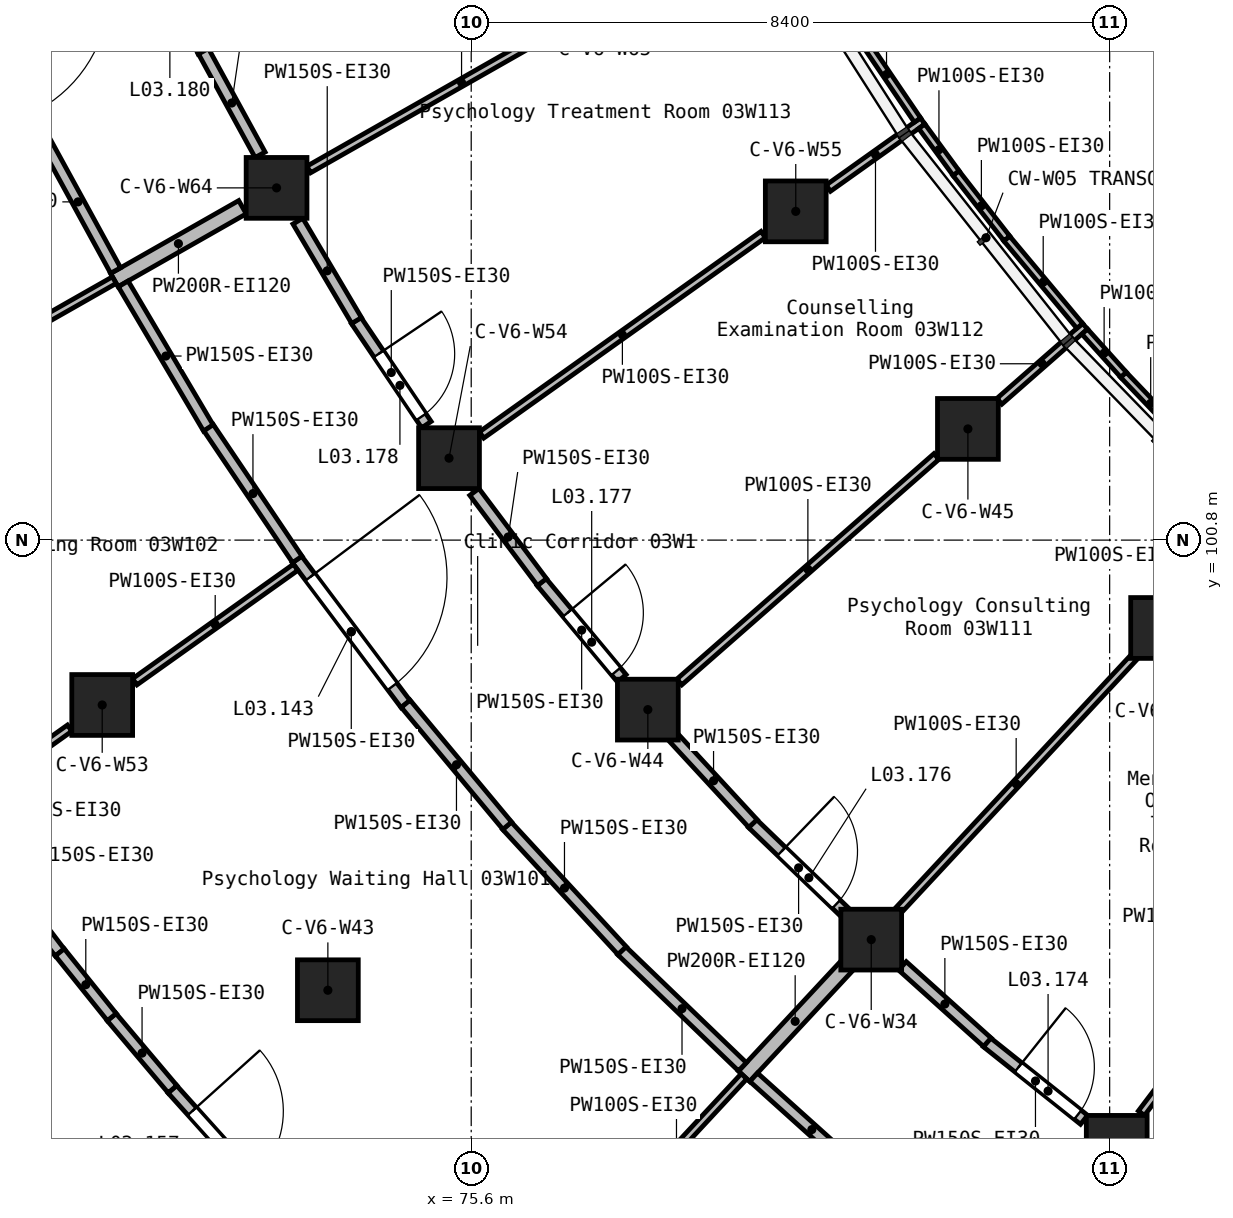
"""IFC4 building model, lengths in metres.
Left out: names, types, materials, properties, quantities, classifications, styles, units other than length and angle.
Written with IfcOpenShell. Run it as: python <this file> out.ifc"""

import sys

from ifc_helpers import new_model, si_unit, direction, frame, frame_2d, origin, origin_2d, place, context, subcontext, project, spatial, rectangle, extrude, element, fill, save


model = new_model("IFC4")
c1 = context("Model", 3, precision=1e-05, world=origin(), true_north=direction((0.0, 1.0)))
c2 = subcontext(c1, "Body", "Model", "MODEL_VIEW")
j1 = project(units=[si_unit("LENGTHUNIT", "METRE"), si_unit("PLANEANGLEUNIT", "RADIAN")], contexts=[c1])
p1 = place(None, origin())
s1 = spatial("IfcSite", under=j1, at=p1, CompositionType="ELEMENT")
p2 = place(p1, origin())
s2 = spatial("IfcBuilding", under=s1, at=p2, CompositionType="ELEMENT")
p3 = place(p2, frame((0.0, 0.0, 16.8)))
s3 = spatial("IfcBuildingStorey", under=s2, at=p3, CompositionType="ELEMENT", Elevation=16.8)
for number, where, z_axis, x_axis in (
    (1, (70.745, 98.631, 0.0), (0.0, 0.0, 1.0), (1.0, 0.0, 0.0)),
    (2, (73.039, 105.434, 0.0), (0.0, 0.0, 1.0), (1.0, 0.0, 0.0)),
    (3, (73.714, 94.878, 0.0), (0.0, 0.0, 1.0), (1.0, 0.0, 0.0)),
    (4, (75.308, 101.878, 0.0), (0.0, 0.0, 1.0), (1.0, 0.0, 0.0)),
    (5, (77.924, 98.57, 0.0), (0.0, 0.0, 1.0), (1.0, 0.0, 0.0)),
    (6, (79.87, 105.125, 0.0), (0.0, 0.0, 1.0), (1.0, 0.0, 0.0)),
    (7, (80.863, 95.544, 0.0), (0.0, 0.0, 1.0), (1.0, 0.0, 0.0)),
    (8, (82.135, 102.263, 0.0), (0.0, 0.0, 1.0), (1.0, 0.0, 0.0)),
    (9, (84.093, 92.831, 0.0), (0.0, 0.0, 1.0), (1.0, 0.0, 0.0)),
    (10, (84.677, 99.644, 0.0), (0.0, 0.0, 1.0), (1.0, 0.0, 0.0)),
):
    element("IfcColumn", number, at=place(p3, frame(where, z_axis=z_axis, x_axis=x_axis)), inside=s3, PredefinedType="COLUMN", context=c2, shape_type="SweptSolid", body=[
        extrude(rectangle(XDim=0.8, YDim=0.8, at=origin_2d()), origin(), (0.0, 0.0, 1.0), 4.2),
    ])
p4 = place(p3, frame((70.905, 104.221, 0.0), z_axis=(0.0, 0.0, 1.0), x_axis=(0.869256176146, 0.494361912198, 0.0)))
e11 = element("IfcWall", 11, at=p4, inside=s3, PredefinedType="SOLIDWALL", context=c2, shape_type="SweptSolid", body=[
    extrude(rectangle(XDim=1.939, YDim=0.2, at=frame_2d((0.97, 0.0))), origin(), (0.0, 0.0, 1.0), 3.9),
])
p5 = place(p3, frame((79.19, 93.746, 0.0), z_axis=(0.0, 0.0, 1.0), x_axis=(0.681171780306, 0.732123627344, 0.0)))
e12 = element("IfcWall", 12, at=p5, inside=s3, PredefinedType="SOLIDWALL", context=c2, shape_type="SweptSolid", body=[
    extrude(rectangle(XDim=1.974, YDim=0.2, at=frame_2d((0.987, 0.0))), origin(), (0.0, 0.0, 1.0), 3.9),
])
p6 = place(p3, frame((73.307, 100.547, 0.0), z_axis=(0.0, 0.0, 1.0), x_axis=(0.600377090661, -0.799717043091, 0.0)))
e13 = element("IfcWall", 13, at=p6, inside=s3, PredefinedType="PARTITIONING", context=c2, shape_type="SweptSolid", body=[
    extrude(rectangle(XDim=2.382, YDim=0.15, at=frame_2d((1.191, 0.0))), origin(), (0.0, 0.0, 1.0), 3.9),
])
p7 = place(p6, frame((0.291, 0.0, 0.0)))
e14 = element("IfcOpeningElement", 14, at=p7, cuts=e13, PredefinedType="OPENING", context=c2, shape_type="SweptSolid", body=[
    extrude(rectangle(XDim=1.8, YDim=2.1, at=frame_2d((0.9, 1.05))), frame((0.0, 0.085, 0.0), z_axis=(0.0, -1.0, 0.0), x_axis=(1.0, 0.0, 0.0)), (0.0, 0.0, 1.0), 0.17),
])
p8 = place(p3, frame((77.579, 95.4, 0.0), z_axis=(0.0, 0.0, 1.0), x_axis=(0.720594722174, -0.693356507415, 0.0)))
e15 = element("IfcWall", 15, at=p8, inside=s3, PredefinedType="PARTITIONING", context=c2, shape_type="SweptSolid", body=[
    extrude(rectangle(XDim=2.205, YDim=0.15, at=frame_2d((1.103, 0.0))), origin(), (0.0, 0.0, 1.0), 3.9),
])
p9 = place(p3, frame((76.069, 97.043, 0.0), z_axis=(0.0, 0.0, 1.0), x_axis=(0.678030610295, -0.735033666918, 0.0)))
e16 = element("IfcWall", 16, at=p9, inside=s3, PredefinedType="PARTITIONING", context=c2, shape_type="SweptSolid", body=[
    extrude(rectangle(XDim=2.236, YDim=0.15, at=frame_2d((1.118, 0.0))), origin(), (0.0, 0.0, 1.0), 3.9),
])
p10 = place(p3, frame((71.021, 104.171, 0.0), z_axis=(0.0, 0.0, 1.0), x_axis=(0.50873677225, -0.860922119916, 0.0)))
e17 = element("IfcWall", 17, at=p10, inside=s3, PredefinedType="PARTITIONING", context=c2, shape_type="SweptSolid", body=[
    extrude(rectangle(XDim=2.205, YDim=0.15, at=frame_2d((1.103, 0.0))), origin(), (0.0, 0.0, 1.0), 3.9),
])
p11 = place(p3, frame((79.316, 93.733, 0.0), z_axis=(0.0, 0.0, 1.0), x_axis=(0.74346507851, -0.668774758073, 0.0)))
e18 = element("IfcWall", 18, at=p11, inside=s3, PredefinedType="PARTITIONING", context=c2, shape_type="SweptSolid", body=[
    extrude(rectangle(XDim=2.059, YDim=0.15, at=frame_2d((1.03, 0.0))), origin(), (0.0, 0.0, 1.0), 3.9),
])
p12 = place(p3, frame((72.145, 102.278, 0.0), z_axis=(0.0, 0.0, 1.0), x_axis=(0.558900636953, -0.829234633873, 0.0)))
e19 = element("IfcWall", 19, at=p12, inside=s3, PredefinedType="PARTITIONING", context=c2, shape_type="SweptSolid", body=[
    extrude(rectangle(XDim=2.089, YDim=0.15, at=frame_2d((1.044, 0.0))), origin(), (0.0, 0.0, 1.0), 3.9),
])
p13 = place(p3, frame((74.738, 98.647, 0.0), z_axis=(0.0, 0.0, 1.0), x_axis=(0.640000381719, -0.768374590548, 0.0)))
e20 = element("IfcWall", 20, at=p13, inside=s3, PredefinedType="PARTITIONING", context=c2, shape_type="SweptSolid", body=[
    extrude(rectangle(XDim=2.088, YDim=0.15, at=frame_2d((1.044, 0.0))), origin(), (0.0, 0.0, 1.0), 3.9),
])
p14 = place(p3, frame((69.933, 106.153, 0.0), z_axis=(0.0, 0.0, 1.0), x_axis=(0.479964929401, -0.877287676047, 0.0)))
e21 = element("IfcWall", 21, at=p14, inside=s3, PredefinedType="PARTITIONING", context=c2, shape_type="SweptSolid", body=[
    extrude(rectangle(XDim=2.059, YDim=0.15, at=frame_2d((1.03, 0.0))), origin(), (0.0, 0.0, 1.0), 3.9),
])
p15 = place(p3, frame((74.086, 103.69, 0.0), z_axis=(0.0, 0.0, 1.0), x_axis=(0.558985889655, -0.829177167538, 0.0)))
e22 = element("IfcWall", 22, at=p15, inside=s3, PredefinedType="PARTITIONING", context=c2, shape_type="SweptSolid", body=[
    extrude(rectangle(XDim=1.654, YDim=0.15, at=frame_2d((0.827, 0.0))), origin(), (0.0, 0.0, 1.0), 3.9),
])
p16 = place(p15, frame((0.53, 0.0, 0.0)))
e23 = element("IfcOpeningElement", 23, at=p16, cuts=e22, PredefinedType="OPENING", context=c2, shape_type="SweptSolid", body=[
    extrude(rectangle(XDim=1.0, YDim=2.1, at=frame_2d((0.5, 1.05))), frame((0.0, 0.085, 0.0), z_axis=(0.0, -1.0, 0.0), x_axis=(1.0, 0.0, 0.0)), (0.0, 0.0, 1.0), 0.17),
])
p17 = place(p3, frame((82.385, 94.194, 0.0), z_axis=(0.0, 0.0, 1.0), x_axis=(0.781756052881, -0.623584375833, 0.0)))
e24 = element("IfcWall", 24, at=p17, inside=s3, PredefinedType="PARTITIONING", context=c2, shape_type="SweptSolid", body=[
    extrude(rectangle(XDim=1.636, YDim=0.15, at=frame_2d((0.818, 0.0))), origin(), (0.0, 0.0, 1.0), 3.9),
])
p18 = place(p17, frame((0.53, 0.0, 0.0)))
e25 = element("IfcOpeningElement", 25, at=p18, cuts=e24, PredefinedType="OPENING", context=c2, shape_type="SweptSolid", body=[
    extrude(rectangle(XDim=1.0, YDim=2.1, at=frame_2d((0.5, 1.05))), frame((0.0, 0.085, 0.0), z_axis=(0.0, -1.0, 0.0), x_axis=(1.0, 0.0, 0.0)), (0.0, 0.0, 1.0), 0.17),
])
p19 = place(p3, frame((71.346, 108.771, 0.0), z_axis=(0.0, 0.0, 1.0), x_axis=(0.42702903496, -0.904237912997, 0.0)))
e26 = element("IfcWall", 26, at=p19, inside=s3, PredefinedType="PARTITIONING", context=c2, shape_type="SweptSolid", body=[
    extrude(rectangle(XDim=1.708, YDim=0.15, at=frame_2d((0.854, 0.0))), origin(), (0.0, 0.0, 1.0), 3.9),
])
p20 = place(p19, frame((0.178, 0.0, 0.0)))
e27 = element("IfcOpeningElement", 27, at=p20, cuts=e26, PredefinedType="OPENING", context=c2, shape_type="SweptSolid", body=[
    extrude(rectangle(XDim=1.0, YDim=2.1, at=frame_2d((0.5, 1.05))), frame((0.0, 0.085, 0.0), z_axis=(0.0, -1.0, 0.0), x_axis=(1.0, 0.0, 0.0)), (0.0, 0.0, 1.0), 0.17),
])
p21 = place(p3, frame((79.301, 97.072, 0.0), z_axis=(0.0, 0.0, 1.0), x_axis=(0.720465115712, -0.69349118022, 0.0)))
e28 = element("IfcWall", 28, at=p21, inside=s3, PredefinedType="PARTITIONING", context=c2, shape_type="SweptSolid", body=[
    extrude(rectangle(XDim=1.684, YDim=0.15, at=frame_2d((0.842, 0.0))), origin(), (0.0, 0.0, 1.0), 3.9),
])
p22 = place(p21, frame((0.53, 0.0, 0.0)))
e29 = element("IfcOpeningElement", 29, at=p22, cuts=e28, PredefinedType="OPENING", context=c2, shape_type="SweptSolid", body=[
    extrude(rectangle(XDim=1.0, YDim=2.1, at=frame_2d((0.5, 1.05))), frame((0.0, 0.085, 0.0), z_axis=(0.0, -1.0, 0.0), x_axis=(1.0, 0.0, 0.0)), (0.0, 0.0, 1.0), 0.17),
])
p23 = place(p3, frame((78.27, 98.195, 0.0), z_axis=(0.0, 0.0, 1.0), x_axis=(0.678273469528, -0.73480956753, 0.0)))
e30 = element("IfcWall", 30, at=p23, inside=s3, PredefinedType="PARTITIONING", context=c2, shape_type="SweptSolid", body=[
    extrude(rectangle(XDim=1.529, YDim=0.15, at=frame_2d((0.764, 0.0))), origin(), (0.0, 0.0, 1.0), 3.9),
])
p24 = place(p3, frame((76.526, 100.249, 0.0), z_axis=(0.0, 0.0, 1.0), x_axis=(0.640038659854, -0.768342706019, 0.0)))
e31 = element("IfcWall", 31, at=p24, inside=s3, PredefinedType="PARTITIONING", context=c2, shape_type="SweptSolid", body=[
    extrude(rectangle(XDim=1.648, YDim=0.15, at=frame_2d((0.824, 0.0))), origin(), (0.0, 0.0, 1.0), 3.9),
])
p25 = place(p24, frame((0.53, 0.0, 0.0)))
e32 = element("IfcOpeningElement", 32, at=p25, cuts=e31, PredefinedType="OPENING", context=c2, shape_type="SweptSolid", body=[
    extrude(rectangle(XDim=1.0, YDim=2.1, at=frame_2d((0.5, 1.05))), frame((0.0, 0.085, 0.0), z_axis=(0.0, -1.0, 0.0), x_axis=(1.0, 0.0, 0.0)), (0.0, 0.0, 1.0), 0.17),
])
p26 = place(p3, frame((73.319, 104.997, 0.0), z_axis=(0.0, 0.0, 1.0), x_axis=(0.508740142918, -0.86092012811, 0.0)))
e33 = element("IfcWall", 33, at=p26, inside=s3, PredefinedType="PARTITIONING", context=c2, shape_type="SweptSolid", body=[
    extrude(rectangle(XDim=1.519, YDim=0.15, at=frame_2d((0.759, 0.0))), origin(), (0.0, 0.0, 1.0), 3.9),
])
p27 = place(p3, frame((75.641, 101.434, 0.0), z_axis=(0.0, 0.0, 1.0), x_axis=(0.60023710435, -0.799822116825, 0.0)))
e34 = element("IfcWall", 34, at=p27, inside=s3, PredefinedType="PARTITIONING", context=c2, shape_type="SweptSolid", body=[
    extrude(rectangle(XDim=1.483, YDim=0.15, at=frame_2d((0.741, 0.0))), origin(), (0.0, 0.0, 1.0), 3.9),
])
p28 = place(p3, frame((81.273, 95.199, 0.0), z_axis=(0.0, 0.0, 1.0), x_axis=(0.743576936712, -0.668650386368, 0.0)))
e35 = element("IfcWall", 35, at=p28, inside=s3, PredefinedType="PARTITIONING", context=c2, shape_type="SweptSolid", body=[
    extrude(rectangle(XDim=1.502, YDim=0.15, at=frame_2d((0.751, 0.0))), origin(), (0.0, 0.0, 1.0), 3.9),
])
p29 = place(p3, frame((72.077, 107.232, 0.0), z_axis=(0.0, 0.0, 1.0), x_axis=(0.480041086357, -0.877246006209, 0.0)))
e36 = element("IfcWall", 36, at=p29, inside=s3, PredefinedType="PARTITIONING", context=c2, shape_type="SweptSolid", body=[
    extrude(rectangle(XDim=1.553, YDim=0.15, at=frame_2d((0.777, 0.0))), origin(), (0.0, 0.0, 1.0), 3.9),
])
p30 = place(p3, frame((71.667, 93.577, 0.0), z_axis=(0.0, 0.0, 1.0), x_axis=(0.668733315137, -0.743502355898, 0.0)))
e37 = element("IfcWall", 37, at=p30, inside=s3, PredefinedType="PARTITIONING", context=c2, shape_type="SweptSolid", body=[
    extrude(rectangle(XDim=1.982, YDim=0.15, at=frame_2d((0.991, 0.0))), origin(), (0.0, 0.0, 1.0), 3.9),
])
p31 = place(p30, frame((0.391, 0.0, 0.0)))
e38 = element("IfcOpeningElement", 38, at=p31, cuts=e37, PredefinedType="OPENING", context=c2, shape_type="SweptSolid", body=[
    extrude(rectangle(XDim=1.2, YDim=2.1, at=frame_2d((0.6, 1.05))), frame((0.0, 0.085, 0.0), z_axis=(0.0, -1.0, 0.0), x_axis=(1.0, 0.0, 0.0)), (0.0, 0.0, 1.0), 0.17),
])
p32 = place(p3, frame((69.433, 96.362, 0.0), z_axis=(0.0, 0.0, 1.0), x_axis=(0.606457599152, -0.795115828311, 0.0)))
e39 = element("IfcWall", 39, at=p32, inside=s3, PredefinedType="PARTITIONING", context=c2, shape_type="SweptSolid", body=[
    extrude(rectangle(XDim=1.242, YDim=0.15, at=frame_2d((0.621, 0.0))), origin(), (0.0, 0.0, 1.0), 3.9),
])
p33 = place(p3, frame((70.869, 94.525, 0.0), z_axis=(0.0, 0.0, 1.0), x_axis=(0.645236922374, -0.763982535144, 0.0)))
e40 = element("IfcWall", 40, at=p33, inside=s3, PredefinedType="PARTITIONING", context=c2, shape_type="SweptSolid", body=[
    extrude(rectangle(XDim=1.242, YDim=0.15, at=frame_2d((0.621, 0.0))), origin(), (0.0, 0.0, 1.0), 3.9),
])
p34 = place(p3, frame((70.187, 95.377, 0.0), z_axis=(0.0, 0.0, 1.0), x_axis=(0.626301399266, -0.779581013928, 0.0)))
e41 = element("IfcWall", 41, at=p34, inside=s3, PredefinedType="PARTITIONING", context=c2, shape_type="SweptSolid", body=[
    extrude(rectangle(XDim=1.093, YDim=0.15, at=frame_2d((0.546, 0.0))), origin(), (0.0, 0.0, 1.0), 3.9),
])
p35 = place(p3, frame((84.418, 93.26, 0.0), z_axis=(0.0, 0.0, 1.0), x_axis=(0.603501117064, 0.797362152163, 0.0)))
e42 = element("IfcWall", 42, at=p35, inside=s3, PredefinedType="PARTITIONING", context=c2, shape_type="SweptSolid", body=[
    extrude(rectangle(XDim=4.522, YDim=0.1, at=frame_2d((2.261, 0.0))), origin(), (0.0, 0.0, 1.0), 3.9),
])
p36 = place(p3, frame((78.338, 98.933, 0.0), z_axis=(0.0, 0.0, 1.0), x_axis=(0.751823288541, 0.659364650863, 0.0)))
e43 = element("IfcWall", 43, at=p36, inside=s3, PredefinedType="PARTITIONING", context=c2, shape_type="SweptSolid", body=[
    extrude(rectangle(XDim=4.5, YDim=0.1, at=frame_2d((2.25, 0.0))), origin(), (0.0, 0.0, 1.0), 3.9),
])
p37 = place(p3, frame((82.549, 102.626, 0.0), z_axis=(0.0, 0.0, 1.0), x_axis=(0.751798799024, 0.659392573347, 0.0)))
e44 = element("IfcWall", 44, at=p37, inside=s3, PredefinedType="PARTITIONING", context=c2, shape_type="SweptSolid", body=[
    extrude(rectangle(XDim=1.498, YDim=0.1, at=frame_2d((0.749, 0.0))), origin(), (0.0, 0.0, 1.0), 3.9),
])
p38 = place(p3, frame((75.736, 102.183, 0.0), z_axis=(0.0, 0.0, 1.0), x_axis=(0.8147152487, 0.579861245072, 0.0)))
e45 = element("IfcWall", 45, at=p38, inside=s3, PredefinedType="PARTITIONING", context=c2, shape_type="SweptSolid", body=[
    extrude(rectangle(XDim=4.548, YDim=0.1, at=frame_2d((2.274, 0.0))), origin(), (0.0, 0.0, 1.0), 3.9),
])
p39 = place(p3, frame((80.298, 105.43, 0.0), z_axis=(0.0, 0.0, 1.0), x_axis=(0.814728250396, 0.579842977027, 0.0)))
e46 = element("IfcWall", 46, at=p39, inside=s3, PredefinedType="PARTITIONING", context=c2, shape_type="SweptSolid", body=[
    extrude(rectangle(XDim=1.524, YDim=0.1, at=frame_2d((0.762, 0.0))), origin(), (0.0, 0.0, 1.0), 3.9),
])
p40 = place(p3, frame((81.227, 95.935, 0.0), z_axis=(0.0, 0.0, 1.0), x_axis=(0.681211440492, 0.732086725288, 0.0)))
e47 = element("IfcWall", 47, at=p40, inside=s3, PredefinedType="PARTITIONING", context=c2, shape_type="SweptSolid", body=[
    extrude(rectangle(XDim=4.53, YDim=0.1, at=frame_2d((2.265, 0.0))), origin(), (0.0, 0.0, 1.0), 3.9),
])
p41 = place(p3, frame((73.463, 105.676, 0.0), z_axis=(0.0, 0.0, 1.0), x_axis=(0.8692549769, 0.494364020874, 0.0)))
e48 = element("IfcWall", 48, at=p41, inside=s3, PredefinedType="PARTITIONING", context=c2, shape_type="SweptSolid", body=[
    extrude(rectangle(XDim=4.625, YDim=0.1, at=frame_2d((2.312, 0.0))), origin(), (0.0, 0.0, 1.0), 3.9),
])
p42 = place(p3, frame((68.595, 102.907, 0.0), z_axis=(0.0, 0.0, 1.0), x_axis=(0.869270757215, 0.494336272846, 0.0)))
e49 = element("IfcWall", 49, at=p42, inside=s3, PredefinedType="PARTITIONING", context=c2, shape_type="SweptSolid", body=[
    extrude(rectangle(XDim=2.656, YDim=0.1, at=frame_2d((1.328, 0.0))), origin(), (0.0, 0.0, 1.0), 3.9),
])
p43 = place(p3, frame((77.412, 91.835, 0.0), z_axis=(0.0, 0.0, 1.0), x_axis=(0.681147107729, 0.732146582067, 0.0)))
e50 = element("IfcWall", 50, at=p43, inside=s3, PredefinedType="PARTITIONING", context=c2, shape_type="SweptSolid", body=[
    extrude(rectangle(XDim=2.609, YDim=0.1, at=frame_2d((1.304, 0.0))), origin(), (0.0, 0.0, 1.0), 3.9),
])
p44 = place(p3, frame((68.861, 97.29, 0.0), z_axis=(0.0, 0.0, 1.0), x_axis=(0.814701484378, 0.5798805837, 0.0)))
e51 = element("IfcWall", 51, at=p44, inside=s3, PredefinedType="PARTITIONING", context=c2, shape_type="SweptSolid", body=[
    extrude(rectangle(XDim=1.787, YDim=0.1, at=frame_2d((0.894, 0.0))), origin(), (0.0, 0.0, 1.0), 3.9),
])
p45 = place(p3, frame((71.173, 98.936, 0.0), z_axis=(0.0, 0.0, 1.0), x_axis=(0.814672160951, 0.579921779355, 0.0)))
e52 = element("IfcWall", 52, at=p45, inside=s3, PredefinedType="PARTITIONING", context=c2, shape_type="SweptSolid", body=[
    extrude(rectangle(XDim=2.598, YDim=0.1, at=frame_2d((1.299, 0.0))), origin(), (0.0, 0.0, 1.0), 3.9),
])
p46 = place(p3, frame((82.645, 104.768, 0.0), z_axis=(0.0, 0.0, 1.0), x_axis=(0.641529064264, -0.767098728785, 0.0)))
e53 = element("IfcWall", 53, at=p46, inside=s3, PredefinedType="PARTITIONING", context=c2, shape_type="SweptSolid", body=[
    extrude(rectangle(XDim=1.499, YDim=0.1, at=frame_2d((0.75, 0.0))), origin(), (0.0, 0.0, 1.0), 3.9),
])
p47 = place(p3, frame((80.657, 107.527, 0.0), z_axis=(0.0, 0.0, 1.0), x_axis=(0.561086061718, -0.827757471332, 0.0)))
e54 = element("IfcWall", 54, at=p47, inside=s3, PredefinedType="PARTITIONING", context=c2, shape_type="SweptSolid", body=[
    extrude(rectangle(XDim=1.452, YDim=0.1, at=frame_2d((0.726, 0.0))), origin(), (0.0, 0.0, 1.0), 3.9),
])
p48 = place(p3, frame((81.977, 105.628, 0.0), z_axis=(0.0, 0.0, 1.0), x_axis=(0.61437453726, -0.78901452963, 0.0)))
e55 = element("IfcWall", 55, at=p48, inside=s3, PredefinedType="PARTITIONING", context=c2, shape_type="SweptSolid", body=[
    extrude(rectangle(XDim=1.09, YDim=0.1, at=frame_2d((0.545, 0.0))), origin(), (0.0, 0.0, 1.0), 3.9),
])
p49 = place(p3, frame((84.18, 102.976, 0.0), z_axis=(0.0, 0.0, 1.0), x_axis=(0.691094804644, -0.722764118502, 0.0)))
e56 = element("IfcWall", 56, at=p49, inside=s3, PredefinedType="PARTITIONING", context=c2, shape_type="SweptSolid", body=[
    extrude(rectangle(XDim=1.041, YDim=0.1, at=frame_2d((0.521, 0.0))), origin(), (0.0, 0.0, 1.0), 3.9),
])
p50 = place(p3, frame((83.672, 103.543, 0.0), z_axis=(0.0, 0.0, 1.0), x_axis=(0.66903540409, -0.743230534945, 0.0)))
e57 = element("IfcWall", 57, at=p50, inside=s3, PredefinedType="PARTITIONING", context=c2, shape_type="SweptSolid", body=[
    extrude(rectangle(XDim=0.763, YDim=0.1, at=frame_2d((0.382, 0.0))), origin(), (0.0, 0.0, 1.0), 3.9),
])
p51 = place(p3, frame((81.529, 106.244, 0.0), z_axis=(0.0, 0.0, 1.0), x_axis=(0.590281268128, -0.807197636578, 0.0)))
e58 = element("IfcWall", 58, at=p51, inside=s3, PredefinedType="PARTITIONING", context=c2, shape_type="SweptSolid", body=[
    extrude(rectangle(XDim=0.763, YDim=0.1, at=frame_2d((0.382, 0.0))), origin(), (0.0, 0.0, 1.0), 3.9),
])
p52 = place(p7, origin())
e59 = element("IfcDoor", 59, at=p52, inside=s3, OperationType="DOUBLE_DOOR_SINGLE_SWING", PredefinedType="DOOR", context=c2, shape_type="SweptSolid", body=[
    extrude(rectangle(XDim=1.8, YDim=2.1, at=frame_2d((0.9, 1.05))), frame((0.0, 0.025, 0.0), z_axis=(0.0, -1.0, 0.0), x_axis=(1.0, 0.0, 0.0)), (0.0, 0.0, 1.0), 0.05),
])
fill(e14, e59)
p53 = place(p31, frame((1.2, 0.0, 0.0), z_axis=(0.0, 0.0, 1.0), x_axis=(-1.0, 0.0, 0.0)))
e60 = element("IfcDoor", 60, at=p53, inside=s3, OperationType="SINGLE_SWING_RIGHT", PredefinedType="DOOR", context=c2, shape_type="SweptSolid", body=[
    extrude(rectangle(XDim=1.2, YDim=2.1, at=frame_2d((0.6, 1.05))), frame((0.0, 0.025, 0.0), z_axis=(0.0, -1.0, 0.0), x_axis=(1.0, 0.0, 0.0)), (0.0, 0.0, 1.0), 0.05),
])
fill(e38, e60)
p54 = place(p18, origin())
e61 = element("IfcDoor", 61, at=p54, inside=s3, OperationType="SINGLE_SWING_RIGHT", PredefinedType="DOOR", context=c2, shape_type="SweptSolid", body=[
    extrude(rectangle(XDim=1.0, YDim=2.1, at=frame_2d((0.5, 1.05))), frame((0.0, 0.025, 0.0), z_axis=(0.0, -1.0, 0.0), x_axis=(1.0, 0.0, 0.0)), (0.0, 0.0, 1.0), 0.05),
])
fill(e25, e61)
p55 = place(p22, origin())
e62 = element("IfcDoor", 62, at=p55, inside=s3, OperationType="SINGLE_SWING_RIGHT", PredefinedType="DOOR", context=c2, shape_type="SweptSolid", body=[
    extrude(rectangle(XDim=1.0, YDim=2.1, at=frame_2d((0.5, 1.05))), frame((0.0, 0.025, 0.0), z_axis=(0.0, -1.0, 0.0), x_axis=(1.0, 0.0, 0.0)), (0.0, 0.0, 1.0), 0.05),
])
fill(e29, e62)
p56 = place(p25, origin())
e63 = element("IfcDoor", 63, at=p56, inside=s3, OperationType="SINGLE_SWING_RIGHT", PredefinedType="DOOR", context=c2, shape_type="SweptSolid", body=[
    extrude(rectangle(XDim=1.0, YDim=2.1, at=frame_2d((0.5, 1.05))), frame((0.0, 0.025, 0.0), z_axis=(0.0, -1.0, 0.0), x_axis=(1.0, 0.0, 0.0)), (0.0, 0.0, 1.0), 0.05),
])
fill(e32, e63)
p57 = place(p16, origin())
e64 = element("IfcDoor", 64, at=p57, inside=s3, OperationType="SINGLE_SWING_RIGHT", PredefinedType="DOOR", context=c2, shape_type="SweptSolid", body=[
    extrude(rectangle(XDim=1.0, YDim=2.1, at=frame_2d((0.5, 1.05))), frame((0.0, 0.025, 0.0), z_axis=(0.0, -1.0, 0.0), x_axis=(1.0, 0.0, 0.0)), (0.0, 0.0, 1.0), 0.05),
])
fill(e23, e64)
save(model, sys.argv[1])
